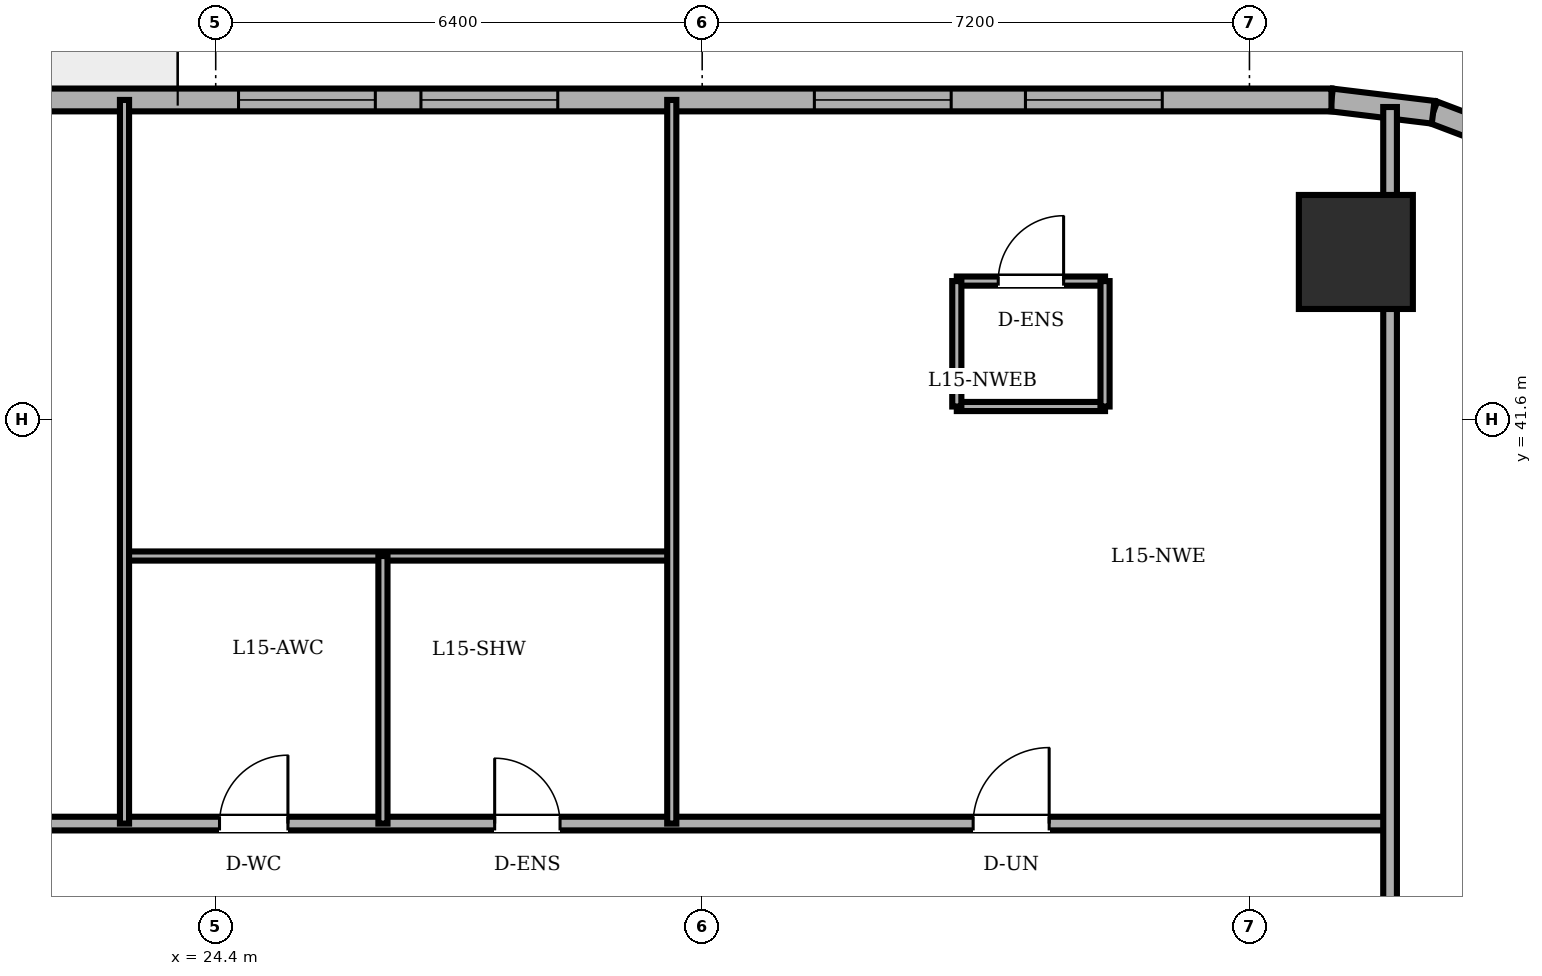
"""IFC4 building model, lengths in metres.
Left out: names, types, materials, properties, quantities, classifications, styles, units other than length and angle.
Written with IfcOpenShell. Run it as: python <this file> out.ifc"""

import sys

from ifc_helpers import new_model, si_unit, direction, frame, frame_2d, origin, origin_2d, place, context, subcontext, project, spatial, rectangle, circle, extrude, element, fill, save


model = new_model("IFC4")
c1 = context("Model", 3, precision=1e-05, world=origin(), true_north=direction((0.0, 1.0)))
c2 = subcontext(c1, "Body", "Model", "MODEL_VIEW")
j1 = project(units=[si_unit("LENGTHUNIT", "METRE"), si_unit("PLANEANGLEUNIT", "RADIAN")], contexts=[c1])
p1 = place(None, origin())
s1 = spatial("IfcSite", under=j1, at=p1, CompositionType="ELEMENT")
p2 = place(p1, origin())
s2 = spatial("IfcBuilding", under=s1, at=p2, CompositionType="ELEMENT")
p3 = place(p2, frame((0.0, 0.0, 57.6)))
s3 = spatial("IfcBuildingStorey", under=s2, at=p3, CompositionType="ELEMENT", Elevation=57.6)
p4 = place(p3, frame((39.4, 43.8, 0.0), z_axis=(0.0, 0.0, 1.0), x_axis=(1.0, 0.0, 0.0)))
e1 = element("IfcColumn", 1, at=p4, inside=s3, PredefinedType="COLUMN", context=c2, shape_type="SweptSolid", body=[
    extrude(circle(Radius=0.75, at=origin_2d()), origin(), (0.0, 0.0, 1.0), 3.6),
])
p5 = place(p3, frame((41.679, 45.16, 0.0), z_axis=(0.0, 0.0, 1.0), x_axis=(-0.935156721165, 0.354234254216, 0.0)))
e2 = element("IfcWall", 2, at=p5, inside=s3, PredefinedType="SOLIDWALL", context=c2, shape_type="SweptSolid", body=[
    extrude(rectangle(XDim=1.349, YDim=0.3, at=frame_2d((0.675, 0.0))), origin(), (0.0, 0.0, 1.0), 3.4),
])
p6 = place(p3, frame((40.417, 45.638, 0.0), z_axis=(0.0, 0.0, 1.0), x_axis=(-0.992739027259, 0.120288086515, 0.0)))
e3 = element("IfcWall", 3, at=p6, inside=s3, PredefinedType="SOLIDWALL", context=c2, shape_type="SweptSolid", body=[
    extrude(rectangle(XDim=1.348, YDim=0.3, at=frame_2d((0.674, 0.0))), origin(), (0.0, 0.0, 1.0), 3.4),
])
p7 = place(p3, frame((39.079, 45.8, 0.0), z_axis=(0.0, 0.0, 1.0), x_axis=(-1.0, 0.0, 0.0)))
e4 = element("IfcWall", 4, at=p7, inside=s3, PredefinedType="SOLIDWALL", context=c2, shape_type="SweptSolid", body=[
    extrude(rectangle(XDim=30.079, YDim=0.3, at=frame_2d((15.04, 0.0))), origin(), (0.0, 0.0, 1.0), 3.4),
])
p8 = place(p7, frame((24.079, 0.0, 0.0)))
e5 = element("IfcOpeningElement", 5, at=p8, cuts=e4, PredefinedType="OPENING", context=c2, shape_type="SweptSolid", body=[
    extrude(rectangle(XDim=0.95, YDim=2.2, at=frame_2d((0.475, 1.1))), frame((0.0, 0.16, 0.0), z_axis=(0.0, -1.0, 0.0), x_axis=(1.0, 0.0, 0.0)), (0.0, 0.0, 1.0), 0.32),
])
p9 = place(p7, frame((2.226, 0.0, 0.85)))
e6 = element("IfcOpeningElement", 6, at=p9, cuts=e4, PredefinedType="OPENING", context=c2, shape_type="SweptSolid", body=[
    extrude(rectangle(XDim=1.8, YDim=1.55, at=frame_2d((0.9, 0.775))), frame((0.0, 0.16, 0.0), z_axis=(0.0, -1.0, 0.0), x_axis=(1.0, 0.0, 0.0)), (0.0, 0.0, 1.0), 0.32),
])
p10 = place(p7, frame((5.003, 0.0, 0.85)))
e7 = element("IfcOpeningElement", 7, at=p10, cuts=e4, PredefinedType="OPENING", context=c2, shape_type="SweptSolid", body=[
    extrude(rectangle(XDim=1.8, YDim=1.55, at=frame_2d((0.9, 0.775))), frame((0.0, 0.16, 0.0), z_axis=(0.0, -1.0, 0.0), x_axis=(1.0, 0.0, 0.0)), (0.0, 0.0, 1.0), 0.32),
])
p11 = place(p7, frame((10.179, 0.0, 0.85)))
e8 = element("IfcOpeningElement", 8, at=p11, cuts=e4, PredefinedType="OPENING", context=c2, shape_type="SweptSolid", body=[
    extrude(rectangle(XDim=1.8, YDim=1.55, at=frame_2d((0.9, 0.775))), frame((0.0, 0.16, 0.0), z_axis=(0.0, -1.0, 0.0), x_axis=(1.0, 0.0, 0.0)), (0.0, 0.0, 1.0), 0.32),
])
p12 = place(p7, frame((12.579, 0.0, 0.85)))
e9 = element("IfcOpeningElement", 9, at=p12, cuts=e4, PredefinedType="OPENING", context=c2, shape_type="SweptSolid", body=[
    extrude(rectangle(XDim=1.8, YDim=1.55, at=frame_2d((0.9, 0.775))), frame((0.0, 0.16, 0.0), z_axis=(0.0, -1.0, 0.0), x_axis=(1.0, 0.0, 0.0)), (0.0, 0.0, 1.0), 0.32),
])
p13 = place(p7, frame((19.596, 0.0, 0.85)))
e10 = element("IfcOpeningElement", 10, at=p13, cuts=e4, PredefinedType="OPENING", context=c2, shape_type="SweptSolid", body=[
    extrude(rectangle(XDim=1.8, YDim=1.55, at=frame_2d((0.9, 0.775))), frame((0.0, 0.16, 0.0), z_axis=(0.0, -1.0, 0.0), x_axis=(1.0, 0.0, 0.0)), (0.0, 0.0, 1.0), 0.32),
])
p14 = place(p3, frame((34.15, 43.417, 0.0), z_axis=(0.0, 0.0, 1.0), x_axis=(1.0, 0.0, 0.0)))
e11 = element("IfcWall", 11, at=p14, inside=s3, PredefinedType="PARTITIONING", context=c2, shape_type="SweptSolid", body=[
    extrude(rectangle(XDim=1.95, YDim=0.12, at=frame_2d((0.975, 0.0))), origin(), (0.0, 0.0, 1.0), 3.4),
])
p15 = place(p14, frame((0.545, 0.0, 0.0)))
e12 = element("IfcOpeningElement", 12, at=p15, cuts=e11, PredefinedType="OPENING", context=c2, shape_type="SweptSolid", body=[
    extrude(rectangle(XDim=0.86, YDim=2.1, at=frame_2d((0.43, 1.05))), frame((0.0, 0.07, 0.0), z_axis=(0.0, -1.0, 0.0), x_axis=(1.0, 0.0, 0.0)), (0.0, 0.0, 1.0), 0.14),
])
p16 = place(p3, frame((36.1, 41.767, 0.0), z_axis=(0.0, 0.0, 1.0), x_axis=(-1.0, 0.0, 0.0)))
e13 = element("IfcWall", 13, at=p16, inside=s3, PredefinedType="PARTITIONING", context=c2, shape_type="SweptSolid", body=[
    extrude(rectangle(XDim=1.95, YDim=0.12, at=frame_2d((0.975, 0.0))), origin(), (0.0, 0.0, 1.0), 3.4),
])
for number, where, z_axis, x_axis in (
    (14, (34.15, 43.417, 0.0), (0.0, 0.0, 1.0), (0.0, -1.0, 0.0)),
    (15, (36.1, 41.767, 0.0), (0.0, 0.0, 1.0), (0.0, 1.0, 0.0)),
):
    element("IfcWall", number, at=place(p3, frame(where, z_axis=z_axis, x_axis=x_axis)), inside=s3, PredefinedType="PARTITIONING", context=c2, shape_type="SweptSolid", body=[
        extrude(rectangle(XDim=1.65, YDim=0.12, at=frame_2d((0.825, 0.0))), origin(), (0.0, 0.0, 1.0), 3.4),
    ])
p17 = place(p3, frame((3.4, 36.28, 0.0), z_axis=(0.0, 0.0, 1.0), x_axis=(1.0, 0.0, 0.0)))
e16 = element("IfcWall", 16, at=p17, inside=s3, PredefinedType="PARTITIONING", context=c2, shape_type="SweptSolid", body=[
    extrude(rectangle(XDim=36.45, YDim=0.18, at=frame_2d((18.225, 0.0))), origin(), (0.0, 0.0, 1.0), 3.4),
])
p18 = place(p17, frame((21.05, 0.0, 0.0)))
e17 = element("IfcOpeningElement", 17, at=p18, cuts=e16, PredefinedType="OPENING", context=c2, shape_type="SweptSolid", body=[
    extrude(rectangle(XDim=0.9, YDim=2.1, at=frame_2d((0.45, 1.05))), frame((0.0, 0.1, 0.0), z_axis=(0.0, -1.0, 0.0), x_axis=(1.0, 0.0, 0.0)), (0.0, 0.0, 1.0), 0.2),
])
p19 = place(p17, frame((24.67, 0.0, 0.0)))
e18 = element("IfcOpeningElement", 18, at=p19, cuts=e16, PredefinedType="OPENING", context=c2, shape_type="SweptSolid", body=[
    extrude(rectangle(XDim=0.86, YDim=2.1, at=frame_2d((0.43, 1.05))), frame((0.0, 0.1, 0.0), z_axis=(0.0, -1.0, 0.0), x_axis=(1.0, 0.0, 0.0)), (0.0, 0.0, 1.0), 0.2),
])
p20 = place(p17, frame((10.7, 0.0, 0.0)))
e19 = element("IfcOpeningElement", 19, at=p20, cuts=e16, PredefinedType="OPENING", context=c2, shape_type="SweptSolid", body=[
    extrude(rectangle(XDim=1.0, YDim=2.15, at=frame_2d((0.5, 1.075))), frame((0.0, 0.1, 0.0), z_axis=(0.0, -1.0, 0.0), x_axis=(1.0, 0.0, 0.0)), (0.0, 0.0, 1.0), 0.2),
])
p21 = place(p17, frame((30.965, 0.0, 0.0)))
e20 = element("IfcOpeningElement", 20, at=p21, cuts=e16, PredefinedType="OPENING", context=c2, shape_type="SweptSolid", body=[
    extrude(rectangle(XDim=1.0, YDim=2.15, at=frame_2d((0.5, 1.075))), frame((0.0, 0.1, 0.0), z_axis=(0.0, -1.0, 0.0), x_axis=(1.0, 0.0, 0.0)), (0.0, 0.0, 1.0), 0.2),
])
p22 = place(p3, frame((23.2, 39.8, 0.0), z_axis=(0.0, 0.0, 1.0), x_axis=(1.0, 0.0, 0.0)))
e21 = element("IfcWall", 21, at=p22, inside=s3, PredefinedType="PARTITIONING", context=c2, shape_type="SweptSolid", body=[
    extrude(rectangle(XDim=7.2, YDim=0.12, at=frame_2d((3.6, 0.0))), origin(), (0.0, 0.0, 1.0), 3.4),
])
p23 = place(p3, frame((23.2, 36.28, 0.0), z_axis=(0.0, 0.0, 1.0), x_axis=(0.0, 1.0, 0.0)))
e22 = element("IfcWall", 22, at=p23, inside=s3, PredefinedType="PARTITIONING", context=c2, shape_type="SweptSolid", body=[
    extrude(rectangle(XDim=9.52, YDim=0.12, at=frame_2d((4.76, 0.0))), origin(), (0.0, 0.0, 1.0), 3.4),
])
p24 = place(p3, frame((26.6, 36.28, 0.0), z_axis=(0.0, 0.0, 1.0), x_axis=(0.0, 1.0, 0.0)))
e23 = element("IfcWall", 23, at=p24, inside=s3, PredefinedType="PARTITIONING", context=c2, shape_type="SweptSolid", body=[
    extrude(rectangle(XDim=3.52, YDim=0.12, at=frame_2d((1.76, 0.0))), origin(), (0.0, 0.0, 1.0), 3.4),
])
p25 = place(p3, frame((30.4, 36.28, 0.0), z_axis=(0.0, 0.0, 1.0), x_axis=(0.0, 1.0, 0.0)))
e24 = element("IfcWall", 24, at=p25, inside=s3, PredefinedType="PARTITIONING", context=c2, shape_type="SweptSolid", body=[
    extrude(rectangle(XDim=9.52, YDim=0.12, at=frame_2d((4.76, 0.0))), origin(), (0.0, 0.0, 1.0), 3.4),
])
p26 = place(p3, frame((39.85, 25.18, 0.0), z_axis=(0.0, 0.0, 1.0), x_axis=(0.0, 1.0, 0.0)))
e25 = element("IfcWall", 25, at=p26, inside=s3, PredefinedType="PARTITIONING", context=c2, shape_type="SweptSolid", body=[
    extrude(rectangle(XDim=20.527, YDim=0.18, at=frame_2d((10.264, 0.0))), origin(), (0.0, 0.0, 1.0), 2.782),
])
p27 = place(p26, frame((5.35, 0.0, 0.0)))
e26 = element("IfcOpeningElement", 26, at=p27, cuts=e25, PredefinedType="OPENING", context=c2, shape_type="SweptSolid", body=[
    extrude(rectangle(XDim=0.92, YDim=2.1, at=frame_2d((0.46, 1.05))), frame((0.0, 0.1, 0.0), z_axis=(0.0, -1.0, 0.0), x_axis=(1.0, 0.0, 0.0)), (0.0, 0.0, 1.0), 0.2),
])
p28 = place(p9, origin())
e27 = element("IfcWindow", 27, at=p28, inside=s3, PartitioningType="DOUBLE_PANEL_VERTICAL", PredefinedType="WINDOW", context=c2, shape_type="SweptSolid", body=[
    extrude(rectangle(XDim=1.8, YDim=1.55, at=frame_2d((0.9, 0.775))), frame((0.0, 0.03, 0.0), z_axis=(0.0, -1.0, 0.0), x_axis=(1.0, 0.0, 0.0)), (0.0, 0.0, 1.0), 0.06),
])
fill(e6, e27)
p29 = place(p10, origin())
e28 = element("IfcWindow", 28, at=p29, inside=s3, PartitioningType="DOUBLE_PANEL_VERTICAL", PredefinedType="WINDOW", context=c2, shape_type="SweptSolid", body=[
    extrude(rectangle(XDim=1.8, YDim=1.55, at=frame_2d((0.9, 0.775))), frame((0.0, 0.03, 0.0), z_axis=(0.0, -1.0, 0.0), x_axis=(1.0, 0.0, 0.0)), (0.0, 0.0, 1.0), 0.06),
])
fill(e7, e28)
p30 = place(p11, origin())
e29 = element("IfcWindow", 29, at=p30, inside=s3, PartitioningType="DOUBLE_PANEL_VERTICAL", PredefinedType="WINDOW", context=c2, shape_type="SweptSolid", body=[
    extrude(rectangle(XDim=1.8, YDim=1.55, at=frame_2d((0.9, 0.775))), frame((0.0, 0.03, 0.0), z_axis=(0.0, -1.0, 0.0), x_axis=(1.0, 0.0, 0.0)), (0.0, 0.0, 1.0), 0.06),
])
fill(e8, e29)
p31 = place(p12, origin())
e30 = element("IfcWindow", 30, at=p31, inside=s3, PartitioningType="DOUBLE_PANEL_VERTICAL", PredefinedType="WINDOW", context=c2, shape_type="SweptSolid", body=[
    extrude(rectangle(XDim=1.8, YDim=1.55, at=frame_2d((0.9, 0.775))), frame((0.0, 0.03, 0.0), z_axis=(0.0, -1.0, 0.0), x_axis=(1.0, 0.0, 0.0)), (0.0, 0.0, 1.0), 0.06),
])
fill(e9, e30)
p32 = place(p15, origin())
e31 = element("IfcDoor", 31, at=p32, inside=s3, OperationType="SINGLE_SWING_RIGHT", PredefinedType="DOOR", context=c2, shape_type="SweptSolid", body=[
    extrude(rectangle(XDim=0.86, YDim=2.1, at=frame_2d((0.43, 1.05))), frame((0.0, 0.025, 0.0), z_axis=(0.0, -1.0, 0.0), x_axis=(1.0, 0.0, 0.0)), (0.0, 0.0, 1.0), 0.05),
])
fill(e12, e31)
p33 = place(p18, origin())
e32 = element("IfcDoor", 32, at=p33, inside=s3, OperationType="SINGLE_SWING_RIGHT", PredefinedType="DOOR", context=c2, shape_type="SweptSolid", body=[
    extrude(rectangle(XDim=0.9, YDim=2.1, at=frame_2d((0.45, 1.05))), frame((0.0, 0.025, 0.0), z_axis=(0.0, -1.0, 0.0), x_axis=(1.0, 0.0, 0.0)), (0.0, 0.0, 1.0), 0.05),
])
fill(e17, e32)
p34 = place(p19, origin())
e33 = element("IfcDoor", 33, at=p34, inside=s3, OperationType="SINGLE_SWING_LEFT", PredefinedType="DOOR", context=c2, shape_type="SweptSolid", body=[
    extrude(rectangle(XDim=0.86, YDim=2.1, at=frame_2d((0.43, 1.05))), frame((0.0, 0.025, 0.0), z_axis=(0.0, -1.0, 0.0), x_axis=(1.0, 0.0, 0.0)), (0.0, 0.0, 1.0), 0.05),
])
fill(e18, e33)
p35 = place(p21, origin())
e34 = element("IfcDoor", 34, at=p35, inside=s3, OperationType="SINGLE_SWING_RIGHT", PredefinedType="DOOR", context=c2, shape_type="SweptSolid", body=[
    extrude(rectangle(XDim=1.0, YDim=2.15, at=frame_2d((0.5, 1.075))), frame((0.0, 0.025, 0.0), z_axis=(0.0, -1.0, 0.0), x_axis=(1.0, 0.0, 0.0)), (0.0, 0.0, 1.0), 0.05),
])
fill(e20, e34)
save(model, sys.argv[1])
